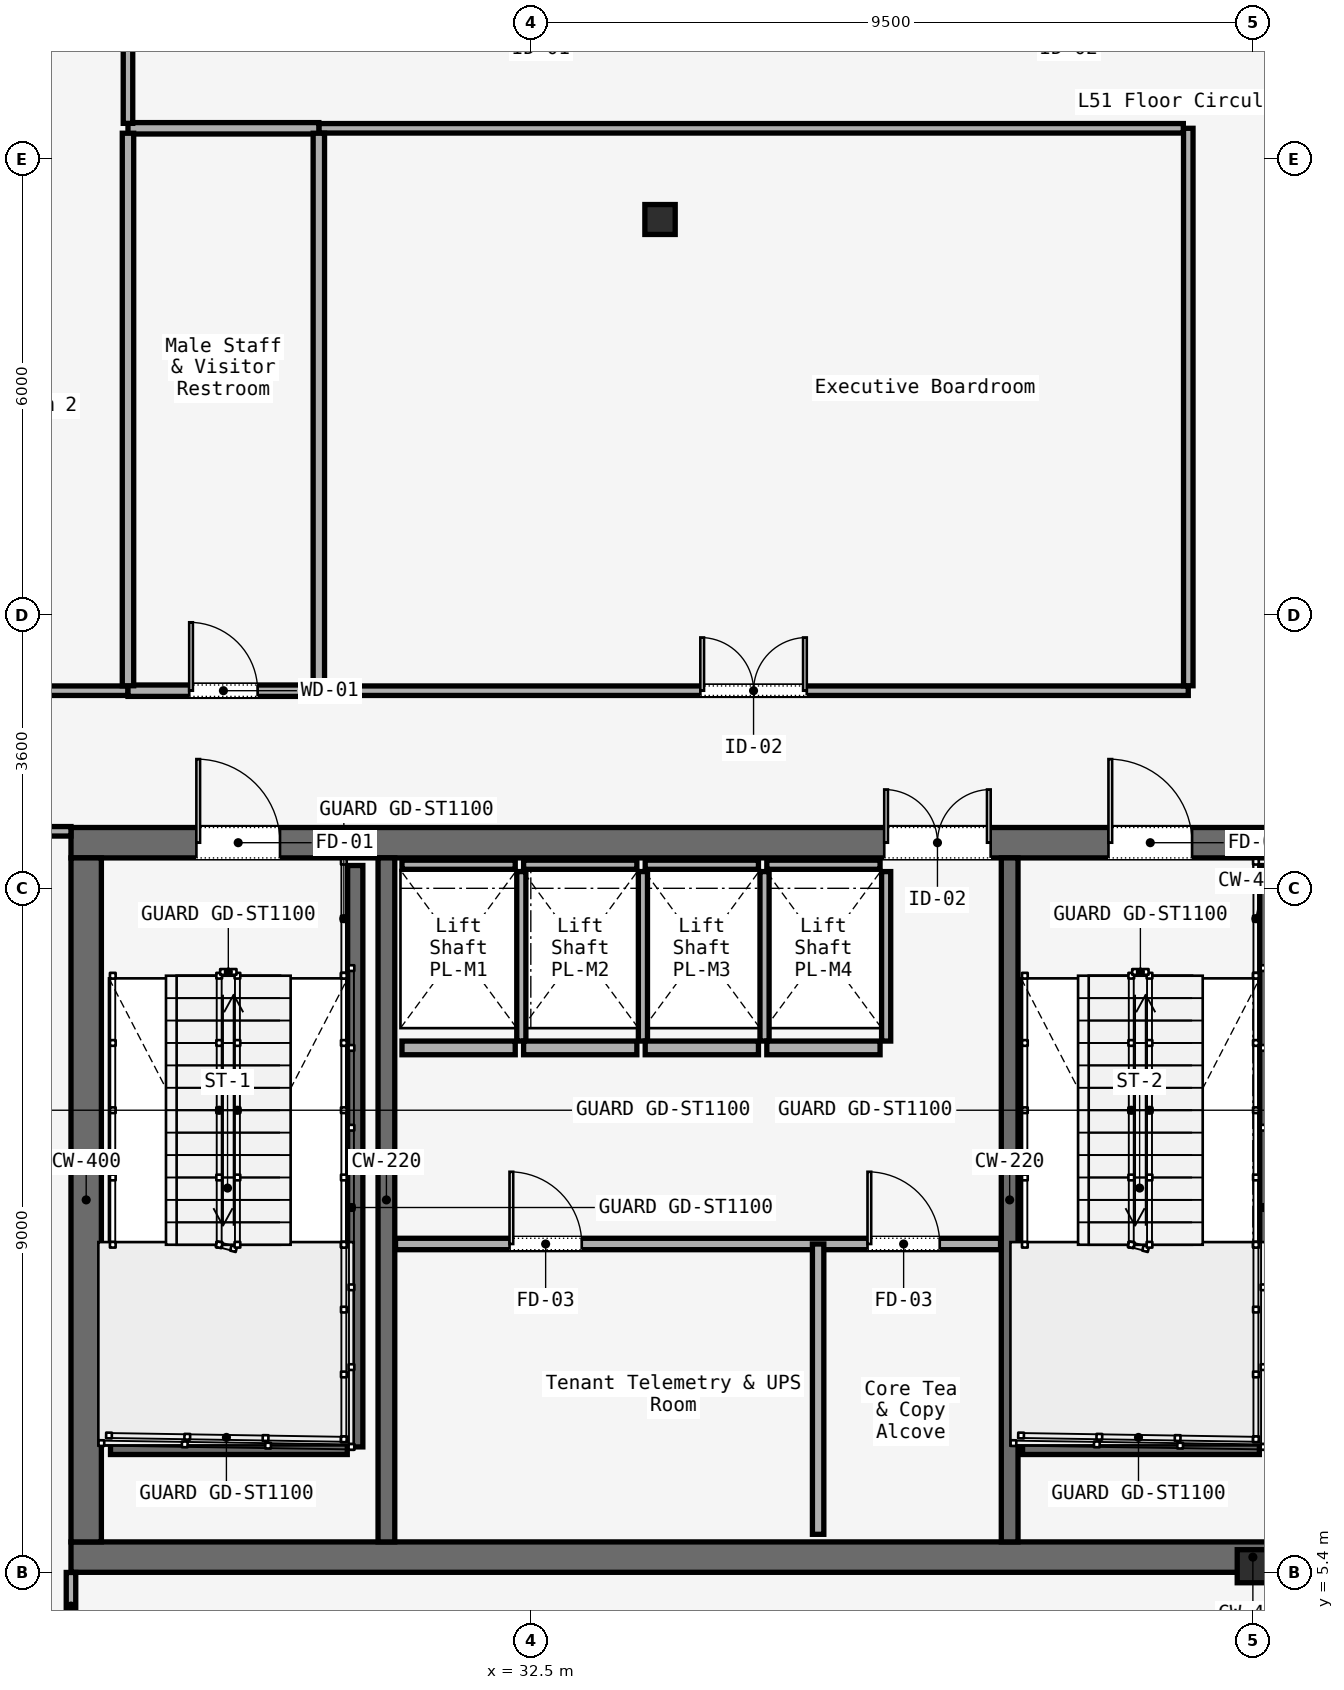
"""IFC4 building model, lengths in metres.
Left out: names, types, materials, properties, quantities, classifications, styles, units other than length and angle.
Written with IfcOpenShell. Run it as: python <this file> out.ifc"""

import sys

from ifc_helpers import new_model, si_unit, direction, frame, frame_2d, origin, origin_2d, place, context, subcontext, project, spatial, rectangle, i_section, extrude, element, fill, save


model = new_model("IFC4")
c1 = context("Model", 3, precision=1e-05, world=origin(), true_north=direction((0.0, 1.0)))
c2 = subcontext(c1, "Body", "Model", "MODEL_VIEW")
j1 = project(units=[si_unit("LENGTHUNIT", "METRE"), si_unit("PLANEANGLEUNIT", "RADIAN")], contexts=[c1])
p1 = place(None, origin())
s1 = spatial("IfcSite", under=j1, at=p1, CompositionType="ELEMENT")
p2 = place(p1, origin())
s2 = spatial("IfcBuilding", under=s1, at=p2, CompositionType="ELEMENT")
p3 = place(p2, frame((0.0, 0.0, 213.2)))
s3 = spatial("IfcBuildingStorey", under=s2, at=p3, CompositionType="ELEMENT", Elevation=213.2)
p4 = place(p3, frame((26.45, 15.0, 0.0), z_axis=(0.0, 0.0, 1.0), x_axis=(1.0, 0.0, 0.0)))
e1 = element("IfcWall", 1, at=p4, inside=s3, PredefinedType="SOLIDWALL", context=c2, shape_type="SweptSolid", body=[
    extrude(rectangle(XDim=31.1, YDim=0.4, at=frame_2d((15.55, 0.0))), origin(), (0.0, 0.0, 1.0), 4.58),
])
p5 = place(p4, frame((1.65, 0.0, 0.0)))
e2 = element("IfcOpeningElement", 2, at=p5, cuts=e1, PredefinedType="OPENING", context=c2, shape_type="SweptSolid", body=[
    extrude(rectangle(XDim=1.1, YDim=2.2, at=frame_2d((0.55, 1.1))), frame((0.0, 0.2, 0.0), z_axis=(0.0, -1.0, 0.0), x_axis=(1.0, 0.0, 0.0)), (0.0, 0.0, 1.0), 0.4),
])
p6 = place(p4, frame((13.65, 0.0, 0.0)))
e3 = element("IfcOpeningElement", 3, at=p6, cuts=e1, PredefinedType="OPENING", context=c2, shape_type="SweptSolid", body=[
    extrude(rectangle(XDim=1.1, YDim=2.2, at=frame_2d((0.55, 1.1))), frame((0.0, 0.2, 0.0), z_axis=(0.0, -1.0, 0.0), x_axis=(1.0, 0.0, 0.0)), (0.0, 0.0, 1.0), 0.4),
])
p7 = place(p4, frame((25.55, 0.0, 0.0)))
e4 = element("IfcOpeningElement", 4, at=p7, cuts=e1, PredefinedType="OPENING", context=c2, shape_type="SweptSolid", body=[
    extrude(rectangle(XDim=1.1, YDim=2.2, at=frame_2d((0.55, 1.1))), frame((0.0, 0.2, 0.0), z_axis=(0.0, -1.0, 0.0), x_axis=(1.0, 0.0, 0.0)), (0.0, 0.0, 1.0), 0.4),
])
p8 = place(p4, frame((10.7, 0.0, 0.0)))
e5 = element("IfcOpeningElement", 5, at=p8, cuts=e1, PredefinedType="OPENING", context=c2, shape_type="SweptSolid", body=[
    extrude(rectangle(XDim=1.4, YDim=2.2, at=frame_2d((0.7, 1.1))), frame((0.0, 0.2, 0.0), z_axis=(0.0, -1.0, 0.0), x_axis=(1.0, 0.0, 0.0)), (0.0, 0.0, 1.0), 0.4),
])
p9 = place(p4, frame((19.35, 0.0, 0.0)))
e6 = element("IfcOpeningElement", 6, at=p9, cuts=e1, PredefinedType="OPENING", context=c2, shape_type="SweptSolid", body=[
    extrude(rectangle(XDim=1.1, YDim=2.2, at=frame_2d((0.55, 1.1))), frame((0.0, 0.2, 0.0), z_axis=(0.0, -1.0, 0.0), x_axis=(1.0, 0.0, 0.0)), (0.0, 0.0, 1.0), 0.4),
])
p10 = place(p4, frame((21.4, 0.0, 0.0)))
e7 = element("IfcOpeningElement", 7, at=p10, cuts=e1, PredefinedType="OPENING", context=c2, shape_type="SweptSolid", body=[
    extrude(rectangle(XDim=0.9, YDim=2.1, at=frame_2d((0.45, 1.05))), frame((0.0, 0.2, 0.0), z_axis=(0.0, -1.0, 0.0), x_axis=(1.0, 0.0, 0.0)), (0.0, 0.0, 1.0), 0.4),
])
p11 = place(p4, frame((23.35, 0.0, 0.0)))
e8 = element("IfcOpeningElement", 8, at=p11, cuts=e1, PredefinedType="OPENING", context=c2, shape_type="SweptSolid", body=[
    extrude(rectangle(XDim=1.3, YDim=2.3, at=frame_2d((0.65, 1.15))), frame((0.0, 0.2, 0.0), z_axis=(0.0, -1.0, 0.0), x_axis=(1.0, 0.0, 0.0)), (0.0, 0.0, 1.0), 0.4),
])
p12 = place(p3, frame((26.45, 5.6, 0.0), z_axis=(0.0, 0.0, 1.0), x_axis=(1.0, 0.0, 0.0)))
e9 = element("IfcWall", 9, at=p12, inside=s3, PredefinedType="SOLIDWALL", context=c2, shape_type="SweptSolid", body=[
    extrude(rectangle(XDim=31.1, YDim=0.4, at=frame_2d((15.55, 0.0))), origin(), (0.0, 0.0, 1.0), 4.58),
])
p13 = place(p3, frame((26.65, 5.8, 0.0), z_axis=(0.0, 0.0, 1.0), x_axis=(0.0, 1.0, 0.0)))
e10 = element("IfcWall", 10, at=p13, inside=s3, PredefinedType="SOLIDWALL", context=c2, shape_type="SweptSolid", body=[
    extrude(rectangle(XDim=9.0, YDim=0.4, at=frame_2d((4.5, 0.0))), origin(), (0.0, 0.0, 1.0), 4.58),
])
for number, where, z_axis, x_axis in (
    (11, (30.6, 5.8, 0.0), (0.0, 0.0, 1.0), (0.0, 1.0, 0.0)),
    (12, (38.8, 5.8, 0.0), (0.0, 0.0, 1.0), (0.0, 1.0, 0.0)),
):
    element("IfcWall", number, at=place(p3, frame(where, z_axis=z_axis, x_axis=x_axis)), inside=s3, PredefinedType="SOLIDWALL", context=c2, shape_type="SweptSolid", body=[
        extrude(rectangle(XDim=9.0, YDim=0.22, at=frame_2d((4.5, 0.0))), origin(), (0.0, 0.0, 1.0), 4.58),
    ])
p14 = place(p3, frame((34.2, 23.2, 0.0), z_axis=(0.0, 0.0, 1.0), x_axis=(1.0, 0.0, 0.0)))
e13 = element("IfcColumn", 13, at=p14, inside=s3, PredefinedType="COLUMN", context=c2, shape_type="SweptSolid", body=[
    extrude(i_section(OverallWidth=0.399, OverallDepth=0.394, WebThickness=0.023, FlangeThickness=0.037, FilletRadius=0.015, at=origin_2d()), origin(), (0.0, 0.0, 1.0), 4.58),
])
p15 = place(p3, frame((42.0, 5.48, 0.0), z_axis=(0.0, 0.0, 1.0), x_axis=(1.0, 0.0, 0.0)))
e14 = element("IfcColumn", 14, at=p15, inside=s3, PredefinedType="COLUMN", context=c2, shape_type="SweptSolid", body=[
    extrude(i_section(OverallWidth=0.412, OverallDepth=0.435, WebThickness=0.036, FlangeThickness=0.044, FilletRadius=0.015, at=origin_2d()), origin(), (0.0, 0.0, 1.0), 4.58),
])
p16 = place(p3, frame((30.19, 14.7, 0.0), z_axis=(0.0, 0.0, 1.0), x_axis=(0.0, -1.0, 0.0)))
e15 = element("IfcWall", 15, at=p16, inside=s3, PredefinedType="SOLIDWALL", context=c2, shape_type="SweptSolid", body=[
    extrude(rectangle(XDim=7.65, YDim=0.2, at=frame_2d((3.825, 0.0))), origin(), (0.0, 0.0, 1.0), 4.8),
])
p17 = place(p3, frame((26.97, 7.05, 0.0), z_axis=(0.0, 0.0, 1.0), x_axis=(1.0, 0.0, 0.0)))
e16 = element("IfcWall", 16, at=p17, inside=s3, PredefinedType="SOLIDWALL", context=c2, shape_type="SweptSolid", body=[
    extrude(rectangle(XDim=3.115, YDim=0.2, at=frame_2d((1.558, 0.0))), origin(), (0.0, 0.0, 1.0), 4.8),
])
p18 = place(p3, frame((42.19, 14.7, 0.0), z_axis=(0.0, 0.0, 1.0), x_axis=(0.0, -1.0, 0.0)))
e17 = element("IfcWall", 17, at=p18, inside=s3, PredefinedType="SOLIDWALL", context=c2, shape_type="SweptSolid", body=[
    extrude(rectangle(XDim=7.65, YDim=0.2, at=frame_2d((3.825, 0.0))), origin(), (0.0, 0.0, 1.0), 4.8),
])
p19 = place(p3, frame((38.97, 7.05, 0.0), z_axis=(0.0, 0.0, 1.0), x_axis=(1.0, 0.0, 0.0)))
e18 = element("IfcWall", 18, at=p19, inside=s3, PredefinedType="SOLIDWALL", context=c2, shape_type="SweptSolid", body=[
    extrude(rectangle(XDim=3.115, YDim=0.2, at=frame_2d((1.558, 0.0))), origin(), (0.0, 0.0, 1.0), 4.8),
])
p20 = place(p3, frame((30.72, 9.72, 0.0), z_axis=(0.0, 0.0, 1.0), x_axis=(1.0, 0.0, 0.0)))
e19 = element("IfcWall", 19, at=p20, inside=s3, PredefinedType="PARTITIONING", context=c2, shape_type="SweptSolid", body=[
    extrude(rectangle(XDim=7.96, YDim=0.15, at=frame_2d((3.98, 0.0))), origin(), (0.0, 0.0, 1.0), 4.01),
])
p21 = place(p20, frame((1.5, 0.0, 0.0)))
e20 = element("IfcOpeningElement", 20, at=p21, cuts=e19, PredefinedType="OPENING", context=c2, shape_type="SweptSolid", body=[
    extrude(rectangle(XDim=0.95, YDim=2.2, at=frame_2d((0.475, 1.1))), frame((0.0, 0.075, 0.0), z_axis=(0.0, -1.0, 0.0), x_axis=(1.0, 0.0, 0.0)), (0.0, 0.0, 1.0), 0.15),
])
p22 = place(p20, frame((6.21, 0.0, 0.0)))
e21 = element("IfcOpeningElement", 21, at=p22, cuts=e19, PredefinedType="OPENING", context=c2, shape_type="SweptSolid", body=[
    extrude(rectangle(XDim=0.95, YDim=2.2, at=frame_2d((0.475, 1.1))), frame((0.0, 0.075, 0.0), z_axis=(0.0, -1.0, 0.0), x_axis=(1.0, 0.0, 0.0)), (0.0, 0.0, 1.0), 0.15),
])
p23 = place(p3, frame((36.28, 5.9, 0.0), z_axis=(0.0, 0.0, 1.0), x_axis=(0.0, 1.0, 0.0)))
e22 = element("IfcWall", 22, at=p23, inside=s3, PredefinedType="PARTITIONING", context=c2, shape_type="SweptSolid", body=[
    extrude(rectangle(XDim=3.82, YDim=0.15, at=frame_2d((1.91, 0.0))), origin(), (0.0, 0.0, 1.0), 4.01),
])
p24 = place(p3, frame((30.805, 12.3, 0.0), z_axis=(0.0, 0.0, 1.0), x_axis=(1.0, 0.0, 0.0)))
e23 = element("IfcWall", 23, at=p24, inside=s3, PredefinedType="SOLIDWALL", context=c2, shape_type="SweptSolid", body=[
    extrude(rectangle(XDim=1.49, YDim=0.18, at=frame_2d((0.745, 0.0))), origin(), (0.0, 0.0, 1.0), 4.01),
])
p25 = place(p3, frame((30.805, 14.71, 0.0), z_axis=(0.0, 0.0, 1.0), x_axis=(1.0, 0.0, 0.0)))
e24 = element("IfcWall", 24, at=p25, inside=s3, PredefinedType="SOLIDWALL", context=c2, shape_type="SweptSolid", body=[
    extrude(rectangle(XDim=1.49, YDim=0.12, at=frame_2d((0.745, 0.0))), origin(), (0.0, 0.0, 1.0), 4.01),
])
p26 = place(p3, frame((32.375, 12.39, 0.0), z_axis=(0.0, 0.0, 1.0), x_axis=(0.0, 1.0, 0.0)))
e25 = element("IfcWall", 25, at=p26, inside=s3, PredefinedType="SOLIDWALL", context=c2, shape_type="SweptSolid", body=[
    extrude(rectangle(XDim=2.23, YDim=0.12, at=frame_2d((1.115, 0.0))), origin(), (0.0, 0.0, 1.0), 4.01),
])
p27 = place(p3, frame((32.405, 12.3, 0.0), z_axis=(0.0, 0.0, 1.0), x_axis=(1.0, 0.0, 0.0)))
e26 = element("IfcWall", 26, at=p27, inside=s3, PredefinedType="SOLIDWALL", context=c2, shape_type="SweptSolid", body=[
    extrude(rectangle(XDim=1.49, YDim=0.18, at=frame_2d((0.745, 0.0))), origin(), (0.0, 0.0, 1.0), 4.01),
])
p28 = place(p3, frame((32.405, 14.71, 0.0), z_axis=(0.0, 0.0, 1.0), x_axis=(1.0, 0.0, 0.0)))
e27 = element("IfcWall", 27, at=p28, inside=s3, PredefinedType="SOLIDWALL", context=c2, shape_type="SweptSolid", body=[
    extrude(rectangle(XDim=1.49, YDim=0.12, at=frame_2d((0.745, 0.0))), origin(), (0.0, 0.0, 1.0), 4.01),
])
p29 = place(p3, frame((33.975, 12.39, 0.0), z_axis=(0.0, 0.0, 1.0), x_axis=(0.0, 1.0, 0.0)))
e28 = element("IfcWall", 28, at=p29, inside=s3, PredefinedType="SOLIDWALL", context=c2, shape_type="SweptSolid", body=[
    extrude(rectangle(XDim=2.23, YDim=0.12, at=frame_2d((1.115, 0.0))), origin(), (0.0, 0.0, 1.0), 4.01),
])
p30 = place(p3, frame((34.005, 12.3, 0.0), z_axis=(0.0, 0.0, 1.0), x_axis=(1.0, 0.0, 0.0)))
e29 = element("IfcWall", 29, at=p30, inside=s3, PredefinedType="SOLIDWALL", context=c2, shape_type="SweptSolid", body=[
    extrude(rectangle(XDim=1.49, YDim=0.18, at=frame_2d((0.745, 0.0))), origin(), (0.0, 0.0, 1.0), 4.01),
])
p31 = place(p3, frame((34.005, 14.71, 0.0), z_axis=(0.0, 0.0, 1.0), x_axis=(1.0, 0.0, 0.0)))
e30 = element("IfcWall", 30, at=p31, inside=s3, PredefinedType="SOLIDWALL", context=c2, shape_type="SweptSolid", body=[
    extrude(rectangle(XDim=1.49, YDim=0.12, at=frame_2d((0.745, 0.0))), origin(), (0.0, 0.0, 1.0), 4.01),
])
p32 = place(p3, frame((35.575, 12.39, 0.0), z_axis=(0.0, 0.0, 1.0), x_axis=(0.0, 1.0, 0.0)))
e31 = element("IfcWall", 31, at=p32, inside=s3, PredefinedType="SOLIDWALL", context=c2, shape_type="SweptSolid", body=[
    extrude(rectangle(XDim=2.23, YDim=0.12, at=frame_2d((1.115, 0.0))), origin(), (0.0, 0.0, 1.0), 4.01),
])
p33 = place(p3, frame((35.605, 12.3, 0.0), z_axis=(0.0, 0.0, 1.0), x_axis=(1.0, 0.0, 0.0)))
e32 = element("IfcWall", 32, at=p33, inside=s3, PredefinedType="SOLIDWALL", context=c2, shape_type="SweptSolid", body=[
    extrude(rectangle(XDim=1.49, YDim=0.18, at=frame_2d((0.745, 0.0))), origin(), (0.0, 0.0, 1.0), 4.01),
])
p34 = place(p3, frame((35.605, 14.71, 0.0), z_axis=(0.0, 0.0, 1.0), x_axis=(1.0, 0.0, 0.0)))
e33 = element("IfcWall", 33, at=p34, inside=s3, PredefinedType="SOLIDWALL", context=c2, shape_type="SweptSolid", body=[
    extrude(rectangle(XDim=1.49, YDim=0.12, at=frame_2d((0.745, 0.0))), origin(), (0.0, 0.0, 1.0), 4.01),
])
p35 = place(p3, frame((37.175, 12.39, 0.0), z_axis=(0.0, 0.0, 1.0), x_axis=(0.0, 1.0, 0.0)))
e34 = element("IfcWall", 34, at=p35, inside=s3, PredefinedType="SOLIDWALL", context=c2, shape_type="SweptSolid", body=[
    extrude(rectangle(XDim=2.23, YDim=0.12, at=frame_2d((1.115, 0.0))), origin(), (0.0, 0.0, 1.0), 4.01),
])
p36 = place(p3, frame((26.45, 15.15, 0.0), z_axis=(0.0, 0.0, 1.0), x_axis=(-1.0, 0.0, 0.0)))
e35 = element("IfcWall", 35, at=p36, inside=s3, PredefinedType="PARTITIONING", context=c2, shape_type="SweptSolid", body=[
    extrude(rectangle(XDim=5.857, YDim=0.125, at=frame_2d((2.928, 0.0))), origin(), (0.0, 0.0, 1.0), 4.01),
])
p37 = place(p36, frame((2.229, 0.0, 0.0)))
e36 = element("IfcOpeningElement", 36, at=p37, cuts=e35, PredefinedType="OPENING", context=c2, shape_type="SweptSolid", body=[
    extrude(rectangle(XDim=1.4, YDim=2.2, at=frame_2d((0.7, 1.1))), frame((0.0, 0.062, 0.0), z_axis=(0.0, -1.0, 0.0), x_axis=(1.0, 0.0, 0.0)), (0.0, 0.0, 1.0), 0.125),
])
p38 = place(p3, frame((20.658, 17.0, 0.0), z_axis=(0.0, 0.0, 1.0), x_axis=(1.0, 0.0, 0.0)))
e37 = element("IfcWall", 37, at=p38, inside=s3, PredefinedType="PARTITIONING", context=c2, shape_type="SweptSolid", body=[
    extrude(rectangle(XDim=6.542, YDim=0.125, at=frame_2d((3.271, 0.0))), origin(), (0.0, 0.0, 1.0), 4.01),
])
p39 = place(p38, frame((2.796, 0.0, 0.0)))
e38 = element("IfcOpeningElement", 38, at=p39, cuts=e37, PredefinedType="OPENING", context=c2, shape_type="SweptSolid", body=[
    extrude(rectangle(XDim=0.95, YDim=2.2, at=frame_2d((0.475, 1.1))), frame((0.0, 0.062, 0.0), z_axis=(0.0, -1.0, 0.0), x_axis=(1.0, 0.0, 0.0)), (0.0, 0.0, 1.0), 0.125),
])
p40 = place(p3, frame((27.2, 17.0, 0.0), z_axis=(0.0, 0.0, 1.0), x_axis=(1.0, 0.0, 0.0)))
e39 = element("IfcWall", 39, at=p40, inside=s3, PredefinedType="PARTITIONING", context=c2, shape_type="SweptSolid", body=[
    extrude(rectangle(XDim=2.511, YDim=0.15, at=frame_2d((1.255, 0.0))), origin(), (0.0, 0.0, 1.0), 4.01),
])
p41 = place(p40, frame((0.805, 0.0, 0.0)))
e40 = element("IfcOpeningElement", 40, at=p41, cuts=e39, PredefinedType="OPENING", context=c2, shape_type="SweptSolid", body=[
    extrude(rectangle(XDim=0.9, YDim=2.15, at=frame_2d((0.45, 1.075))), frame((0.0, 0.075, 0.0), z_axis=(0.0, -1.0, 0.0), x_axis=(1.0, 0.0, 0.0)), (0.0, 0.0, 1.0), 0.15),
])
p42 = place(p3, frame((29.711, 17.0, 0.0), z_axis=(0.0, 0.0, 1.0), x_axis=(1.0, 0.0, 0.0)))
e41 = element("IfcWall", 41, at=p42, inside=s3, PredefinedType="PARTITIONING", context=c2, shape_type="SweptSolid", body=[
    extrude(rectangle(XDim=11.439, YDim=0.125, at=frame_2d((5.719, 0.0))), origin(), (0.0, 0.0, 1.0), 4.01),
])
p43 = place(p42, frame((5.02, 0.0, 0.0)))
e42 = element("IfcOpeningElement", 42, at=p43, cuts=e41, PredefinedType="OPENING", context=c2, shape_type="SweptSolid", body=[
    extrude(rectangle(XDim=1.4, YDim=2.2, at=frame_2d((0.7, 1.1))), frame((0.0, 0.062, 0.0), z_axis=(0.0, -1.0, 0.0), x_axis=(1.0, 0.0, 0.0)), (0.0, 0.0, 1.0), 0.125),
])
p44 = place(p3, frame((41.15, 17.065, 0.0), z_axis=(0.0, 0.0, 1.0), x_axis=(0.0, 1.0, 0.0)))
e43 = element("IfcWall", 43, at=p44, inside=s3, PredefinedType="PARTITIONING", context=c2, shape_type="SweptSolid", body=[
    extrude(rectangle(XDim=7.335, YDim=0.125, at=frame_2d((3.667, 0.0))), origin(), (0.0, 0.0, 1.0), 4.01),
])
p45 = place(p3, frame((41.085, 24.4, 0.0), z_axis=(0.0, 0.0, 1.0), x_axis=(-1.0, 0.0, 0.0)))
e44 = element("IfcWall", 44, at=p45, inside=s3, PredefinedType="PARTITIONING", context=c2, shape_type="SweptSolid", body=[
    extrude(rectangle(XDim=11.374, YDim=0.125, at=frame_2d((5.687, 0.0))), origin(), (0.0, 0.0, 1.0), 4.01),
])
p46 = place(p3, frame((29.711, 24.4, 0.0), z_axis=(0.0, 0.0, 1.0), x_axis=(-1.0, 0.0, 0.0)))
e45 = element("IfcWall", 45, at=p46, inside=s3, PredefinedType="PARTITIONING", context=c2, shape_type="SweptSolid", body=[
    extrude(rectangle(XDim=2.511, YDim=0.15, at=frame_2d((1.255, 0.0))), origin(), (0.0, 0.0, 1.0), 4.01),
])
p47 = place(p3, frame((27.2, 24.465, 0.0), z_axis=(0.0, 0.0, 1.0), x_axis=(0.0, 1.0, 0.0)))
e46 = element("IfcWall", 46, at=p47, inside=s3, PredefinedType="PARTITIONING", context=c2, shape_type="SweptSolid", body=[
    extrude(rectangle(XDim=1.735, YDim=0.125, at=frame_2d((0.867, 0.0))), origin(), (0.0, 0.0, 1.0), 4.01),
])
p48 = place(p3, frame((26.45, 5.398, 0.0), z_axis=(0.0, 0.0, 1.0), x_axis=(0.0, -1.0, 0.0)))
e47 = element("IfcWall", 47, at=p48, inside=s3, PredefinedType="PARTITIONING", context=c2, shape_type="SweptSolid", body=[
    extrude(rectangle(XDim=0.885, YDim=0.125, at=frame_2d((0.442, 0.0))), origin(), (0.0, 0.0, 1.0), 4.01),
])
for number, where, z_axis, x_axis in (
    (48, (27.2, 17.065, 0.0), (0.0, 0.0, 1.0), (0.0, 1.0, 0.0)),
    (49, (29.711, 24.335, 0.0), (0.0, 0.0, 1.0), (0.0, -1.0, 0.0)),
):
    element("IfcWall", number, at=place(p3, frame(where, z_axis=z_axis, x_axis=x_axis)), inside=s3, PredefinedType="PARTITIONING", context=c2, shape_type="SweptSolid", body=[
        extrude(rectangle(XDim=7.27, YDim=0.15, at=frame_2d((3.635, 0.0))), origin(), (0.0, 0.0, 1.0), 4.01),
    ])
p49 = place(p5, origin())
e50 = element("IfcDoor", 50, at=p49, inside=s3, OperationType="SINGLE_SWING_RIGHT", PredefinedType="DOOR", context=c2, shape_type="SweptSolid", body=[
    extrude(rectangle(XDim=1.1, YDim=2.2, at=frame_2d((0.55, 1.1))), frame((0.0, 0.025, 0.0), z_axis=(0.0, -1.0, 0.0), x_axis=(1.0, 0.0, 0.0)), (0.0, 0.0, 1.0), 0.05),
])
fill(e2, e50)
p50 = place(p6, origin())
e51 = element("IfcDoor", 51, at=p50, inside=s3, OperationType="SINGLE_SWING_LEFT", PredefinedType="DOOR", context=c2, shape_type="SweptSolid", body=[
    extrude(rectangle(XDim=1.1, YDim=2.2, at=frame_2d((0.55, 1.1))), frame((0.0, 0.025, 0.0), z_axis=(0.0, -1.0, 0.0), x_axis=(1.0, 0.0, 0.0)), (0.0, 0.0, 1.0), 0.05),
])
fill(e3, e51)
p51 = place(p8, origin())
e52 = element("IfcDoor", 52, at=p51, inside=s3, OperationType="DOUBLE_DOOR_SINGLE_SWING", PredefinedType="DOOR", context=c2, shape_type="SweptSolid", body=[
    extrude(rectangle(XDim=1.4, YDim=2.2, at=frame_2d((0.7, 1.1))), frame((0.0, 0.025, 0.0), z_axis=(0.0, -1.0, 0.0), x_axis=(1.0, 0.0, 0.0)), (0.0, 0.0, 1.0), 0.05),
])
fill(e5, e52)
p52 = place(p21, origin())
e53 = element("IfcDoor", 53, at=p52, inside=s3, OperationType="SINGLE_SWING_LEFT", PredefinedType="DOOR", context=c2, shape_type="SweptSolid", body=[
    extrude(rectangle(XDim=0.95, YDim=2.2, at=frame_2d((0.475, 1.1))), frame((0.0, 0.025, 0.0), z_axis=(0.0, -1.0, 0.0), x_axis=(1.0, 0.0, 0.0)), (0.0, 0.0, 1.0), 0.05),
])
fill(e20, e53)
p53 = place(p22, origin())
e54 = element("IfcDoor", 54, at=p53, inside=s3, OperationType="SINGLE_SWING_RIGHT", PredefinedType="DOOR", context=c2, shape_type="SweptSolid", body=[
    extrude(rectangle(XDim=0.95, YDim=2.2, at=frame_2d((0.475, 1.1))), frame((0.0, 0.025, 0.0), z_axis=(0.0, -1.0, 0.0), x_axis=(1.0, 0.0, 0.0)), (0.0, 0.0, 1.0), 0.05),
])
fill(e21, e54)
p54 = place(p41, origin())
e55 = element("IfcDoor", 55, at=p54, inside=s3, OperationType="SINGLE_SWING_RIGHT", PredefinedType="DOOR", context=c2, shape_type="SweptSolid", body=[
    extrude(rectangle(XDim=0.9, YDim=2.15, at=frame_2d((0.45, 1.075))), frame((0.0, 0.025, 0.0), z_axis=(0.0, -1.0, 0.0), x_axis=(1.0, 0.0, 0.0)), (0.0, 0.0, 1.0), 0.05),
])
fill(e40, e55)
p55 = place(p43, origin())
e56 = element("IfcDoor", 56, at=p55, inside=s3, OperationType="SINGLE_SWING_LEFT", PredefinedType="DOOR", context=c2, shape_type="SweptSolid", body=[
    extrude(rectangle(XDim=1.4, YDim=2.2, at=frame_2d((0.7, 1.1))), frame((0.0, 0.025, 0.0), z_axis=(0.0, -1.0, 0.0), x_axis=(1.0, 0.0, 0.0)), (0.0, 0.0, 1.0), 0.05),
])
fill(e42, e56)
save(model, sys.argv[1])
